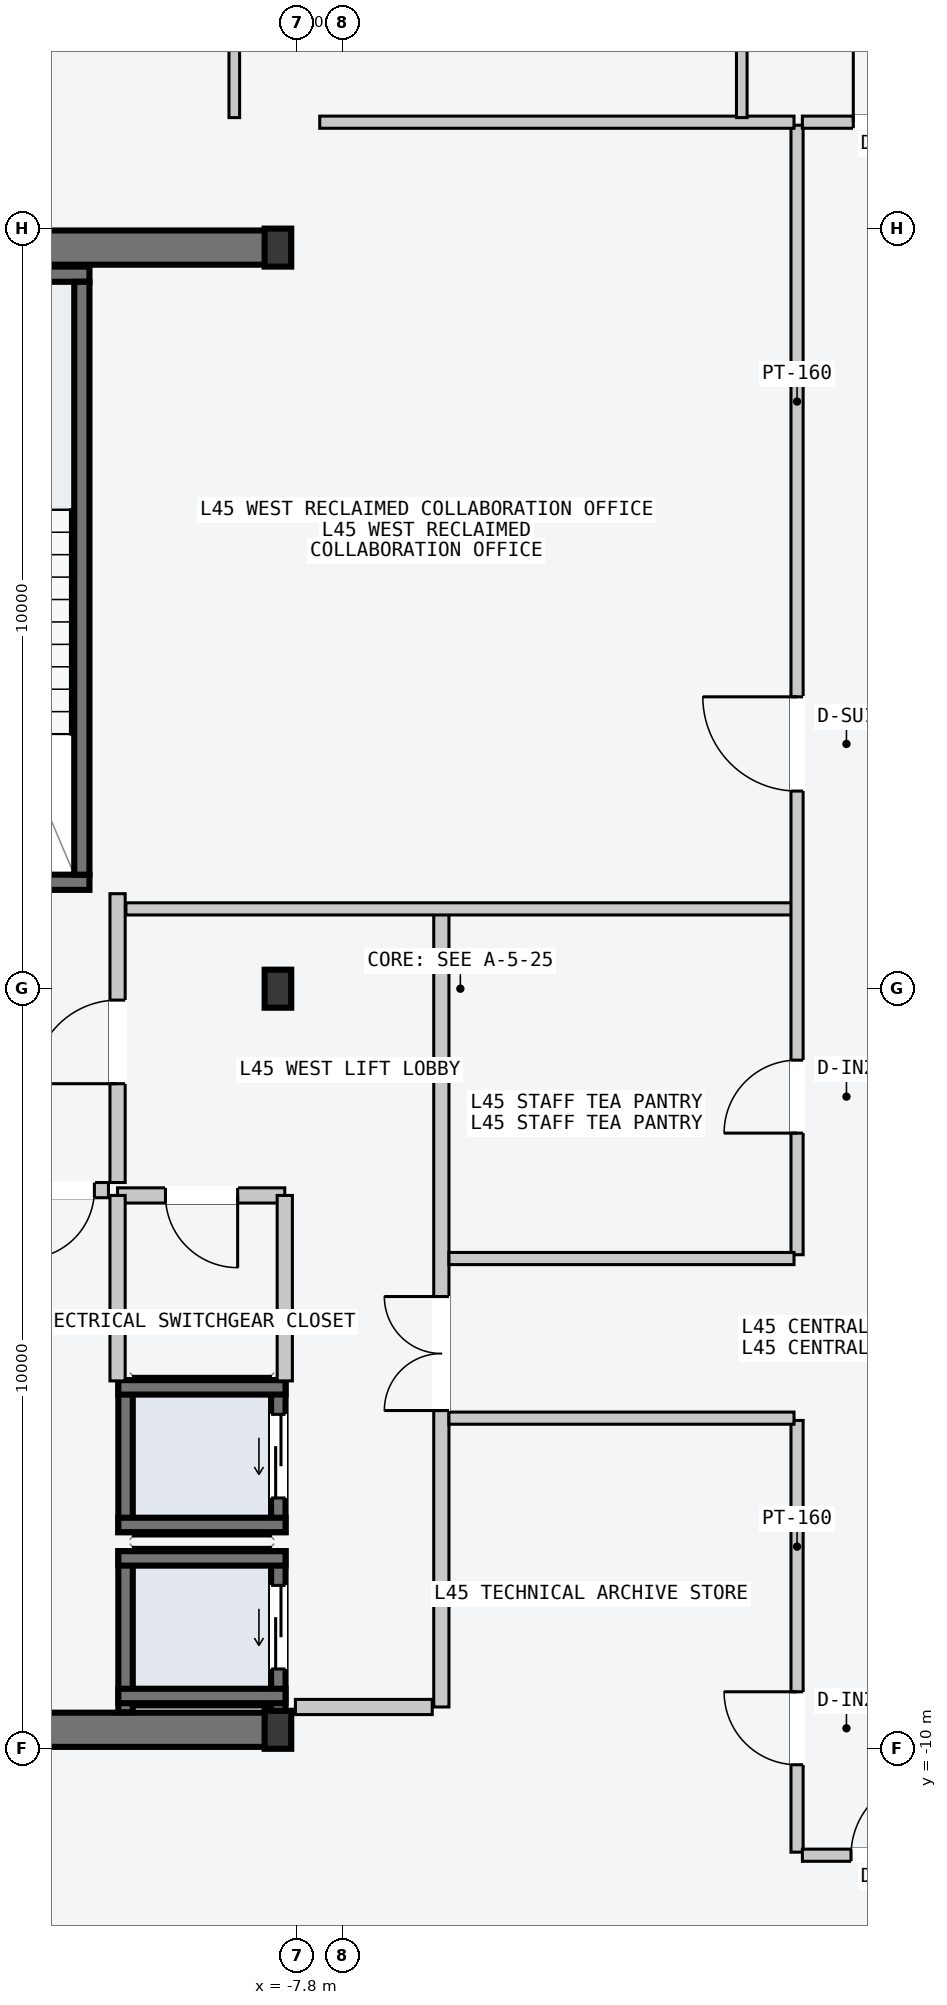
"""IFC4 building model, lengths in metres.
Left out: names, types, materials, properties, quantities, classifications, styles, units other than length and angle.
Written with IfcOpenShell. Run it as: python <this file> out.ifc"""

import sys

from ifc_helpers import new_model, si_unit, direction, frame, frame_2d, origin, origin_2d, place, context, subcontext, project, spatial, rectangle, i_section, extrude, element, fill, save


model = new_model("IFC4")
c1 = context("Model", 3, precision=1e-05, world=origin(), true_north=direction((0.0, 1.0)))
c2 = subcontext(c1, "Body", "Model", "MODEL_VIEW")
j1 = project(units=[si_unit("LENGTHUNIT", "METRE"), si_unit("PLANEANGLEUNIT", "RADIAN")], contexts=[c1])
p1 = place(None, origin())
s1 = spatial("IfcSite", under=j1, at=p1, CompositionType="ELEMENT")
p2 = place(p1, origin())
s2 = spatial("IfcBuilding", under=s1, at=p2, CompositionType="ELEMENT")
p3 = place(p2, frame((0.0, 0.0, 173.1)))
s3 = spatial("IfcBuildingStorey", under=s2, at=p3, CompositionType="ELEMENT", Elevation=173.1)
for number, where, z_axis, x_axis in (
    (1, (-14.53, -9.75, -0.2), (0.0, 0.0, 1.0), (1.0, 0.0, 0.0)),
    (2, (-14.53, 9.75, -0.2), (0.0, 0.0, 1.0), (1.0, 0.0, 0.0)),
):
    element("IfcWall", number, at=place(p3, frame(where, z_axis=z_axis, x_axis=x_axis)), inside=s3, PredefinedType="SHEAR", context=c2, shape_type="SweptSolid", body=[
        extrude(rectangle(XDim=6.46, YDim=0.45, at=frame_2d((3.23, 0.0))), origin(), (0.0, 0.0, 1.0), 3.6),
    ])
p4 = place(p3, frame((-14.25, 1.4, -0.2), z_axis=(0.0, 0.0, 1.0), x_axis=(1.0, 0.0, 0.0)))
e3 = element("IfcWall", 3, at=p4, inside=s3, PredefinedType="SOLIDWALL", context=c2, shape_type="SweptSolid", body=[
    extrude(rectangle(XDim=3.72, YDim=0.2, at=frame_2d((1.86, 0.0))), origin(), (0.0, 0.0, 1.0), 3.6),
])
p5 = place(p4, frame((1.5, 0.0, 0.2)))
e4 = element("IfcOpeningElement", 4, at=p5, cuts=e3, PredefinedType="OPENING", context=c2, shape_type="SweptSolid", body=[
    extrude(rectangle(XDim=1.12, YDim=2.18, at=frame_2d((0.56, 1.09))), frame((0.0, 0.11, 0.0), z_axis=(0.0, -1.0, 0.0), x_axis=(1.0, 0.0, 0.0)), (0.0, 0.0, 1.0), 0.22),
])
p6 = place(p3, frame((-14.25, 9.4, -0.2), z_axis=(0.0, 0.0, 1.0), x_axis=(1.0, 0.0, 0.0)))
e5 = element("IfcWall", 5, at=p6, inside=s3, PredefinedType="SOLIDWALL", context=c2, shape_type="SweptSolid", body=[
    extrude(rectangle(XDim=3.72, YDim=0.2, at=frame_2d((1.86, 0.0))), origin(), (0.0, 0.0, 1.0), 3.6),
])
p7 = place(p3, frame((-10.63, 1.5, -0.2), z_axis=(0.0, 0.0, 1.0), x_axis=(0.0, 1.0, 0.0)))
e6 = element("IfcWall", 6, at=p7, inside=s3, PredefinedType="SOLIDWALL", context=c2, shape_type="SweptSolid", body=[
    extrude(rectangle(XDim=7.8, YDim=0.2, at=frame_2d((3.9, 0.0))), origin(), (0.0, 0.0, 1.0), 3.6),
])
for number, where, z_axis, x_axis in (
    (7, (-8.05, -9.75, 0.0), (0.0, 0.0, 1.0), (1.0, 0.0, 0.0)),
    (8, (-8.05, 0.0, 0.0), (0.0, 0.0, 1.0), (1.0, 0.0, 0.0)),
    (9, (-8.05, 9.75, 0.0), (0.0, 0.0, 1.0), (1.0, 0.0, 0.0)),
):
    element("IfcColumn", number, at=place(p3, frame(where, z_axis=z_axis, x_axis=x_axis)), inside=s3, PredefinedType="COLUMN", context=c2, shape_type="SweptSolid", body=[
        extrude(i_section(OverallWidth=0.35, OverallDepth=0.5, WebThickness=0.02, FlangeThickness=0.032, at=origin_2d()), origin(), (0.0, 0.0, 1.0), 3.6),
    ])
p8 = place(p3, frame((-8.045, -9.52, -0.2), z_axis=(0.0, 0.0, 1.0), x_axis=(0.0, 1.0, 0.0)))
e10 = element("IfcWall", 10, at=p8, inside=s3, PredefinedType="SOLIDWALL", context=c2, shape_type="SweptSolid", body=[
    extrude(rectangle(XDim=2.12, YDim=0.19, at=frame_2d((1.06, 0.0))), origin(), (0.0, 0.0, 1.0), 3.6),
])
p9 = place(p8, frame((0.57, 0.0, 0.2)))
e11 = element("IfcOpeningElement", 11, at=p9, cuts=e10, PredefinedType="OPENING", context=c2, shape_type="SweptSolid", body=[
    extrude(rectangle(XDim=1.1, YDim=2.2, at=frame_2d((0.55, 1.1))), frame((0.0, 0.105, 0.0), z_axis=(0.0, -1.0, 0.0), x_axis=(1.0, 0.0, 0.0)), (0.0, 0.0, 1.0), 0.21),
])
p10 = place(p3, frame((-10.055, -9.52, -0.2), z_axis=(0.0, 0.0, 1.0), x_axis=(0.0, 1.0, 0.0)))
e12 = element("IfcWall", 12, at=p10, inside=s3, PredefinedType="SOLIDWALL", context=c2, shape_type="SweptSolid", body=[
    extrude(rectangle(XDim=2.12, YDim=0.19, at=frame_2d((1.06, 0.0))), origin(), (0.0, 0.0, 1.0), 3.6),
])
for number, where, z_axis, x_axis in (
    (13, (-10.15, -7.495, -0.2), (0.0, 0.0, 1.0), (1.0, 0.0, 0.0)),
    (14, (-10.15, -9.305, -0.2), (0.0, 0.0, 1.0), (1.0, 0.0, 0.0)),
):
    element("IfcWall", number, at=place(p3, frame(where, z_axis=z_axis, x_axis=x_axis)), inside=s3, PredefinedType="SOLIDWALL", context=c2, shape_type="SweptSolid", body=[
        extrude(rectangle(XDim=2.2, YDim=0.19, at=frame_2d((1.1, 0.0))), origin(), (0.0, 0.0, 1.0), 3.6),
    ])
p11 = place(p3, frame((-8.045, -7.15, -0.2), z_axis=(0.0, 0.0, 1.0), x_axis=(0.0, 1.0, 0.0)))
e15 = element("IfcWall", 15, at=p11, inside=s3, PredefinedType="SOLIDWALL", context=c2, shape_type="SweptSolid", body=[
    extrude(rectangle(XDim=2.0, YDim=0.19, at=frame_2d((1.0, 0.0))), origin(), (0.0, 0.0, 1.0), 3.6),
])
p12 = place(p11, frame((0.45, 0.0, 0.2)))
e16 = element("IfcOpeningElement", 16, at=p12, cuts=e15, PredefinedType="OPENING", context=c2, shape_type="SweptSolid", body=[
    extrude(rectangle(XDim=1.1, YDim=2.2, at=frame_2d((0.55, 1.1))), frame((0.0, 0.105, 0.0), z_axis=(0.0, -1.0, 0.0), x_axis=(1.0, 0.0, 0.0)), (0.0, 0.0, 1.0), 0.21),
])
p13 = place(p3, frame((-10.055, -7.15, -0.2), z_axis=(0.0, 0.0, 1.0), x_axis=(0.0, 1.0, 0.0)))
e17 = element("IfcWall", 17, at=p13, inside=s3, PredefinedType="SOLIDWALL", context=c2, shape_type="SweptSolid", body=[
    extrude(rectangle(XDim=2.0, YDim=0.19, at=frame_2d((1.0, 0.0))), origin(), (0.0, 0.0, 1.0), 3.6),
])
for number, where, z_axis, x_axis in (
    (18, (-10.15, -5.245, -0.2), (0.0, 0.0, 1.0), (1.0, 0.0, 0.0)),
    (19, (-10.15, -7.055, -0.2), (0.0, 0.0, 1.0), (1.0, 0.0, 0.0)),
):
    element("IfcWall", number, at=place(p3, frame(where, z_axis=z_axis, x_axis=x_axis)), inside=s3, PredefinedType="SOLIDWALL", context=c2, shape_type="SweptSolid", body=[
        extrude(rectangle(XDim=2.2, YDim=0.19, at=frame_2d((1.1, 0.0))), origin(), (0.0, 0.0, 1.0), 3.6),
    ])
p14 = place(p3, frame((-5.9, -9.45, 0.0), z_axis=(0.0, 0.0, 1.0), x_axis=(0.0, 1.0, 0.0)))
e20 = element("IfcWall", 20, at=p14, inside=s3, PredefinedType="PARTITIONING", context=c2, shape_type="SweptSolid", body=[
    extrude(rectangle(XDim=10.5, YDim=0.2, at=frame_2d((5.25, 0.0))), origin(), (0.0, 0.0, 1.0), 3.4),
])
p15 = place(p14, frame((3.9, 0.0, 0.0)))
e21 = element("IfcOpeningElement", 21, at=p15, cuts=e20, PredefinedType="OPENING", context=c2, shape_type="SweptSolid", body=[
    extrude(rectangle(XDim=1.5, YDim=2.2, at=frame_2d((0.75, 1.1))), frame((0.0, 0.11, 0.0), z_axis=(0.0, -1.0, 0.0), x_axis=(1.0, 0.0, 0.0)), (0.0, 0.0, 1.0), 0.22),
])
p16 = place(p3, frame((-6.02, -9.45, 0.0), z_axis=(0.0, 0.0, 1.0), x_axis=(-1.0, 0.0, 0.0)))
e22 = element("IfcWall", 22, at=p16, inside=s3, PredefinedType="PARTITIONING", context=c2, shape_type="SweptSolid", body=[
    extrude(rectangle(XDim=1.8, YDim=0.2, at=frame_2d((0.9, 0.0))), origin(), (0.0, 0.0, 1.0), 3.4),
])
p17 = place(p3, frame((-10.16, -2.55, 0.0), z_axis=(0.0, 0.0, 1.0), x_axis=(0.0, 1.0, 0.0)))
e23 = element("IfcWall", 23, at=p17, inside=s3, PredefinedType="PARTITIONING", context=c2, shape_type="SweptSolid", body=[
    extrude(rectangle(XDim=3.8, YDim=0.2, at=frame_2d((1.9, 0.0))), origin(), (0.0, 0.0, 1.0), 3.4),
])
p18 = place(p17, frame((1.3, 0.0, 0.0)))
e24 = element("IfcOpeningElement", 24, at=p18, cuts=e23, PredefinedType="OPENING", context=c2, shape_type="SweptSolid", body=[
    extrude(rectangle(XDim=1.1, YDim=2.15, at=frame_2d((0.55, 1.075))), frame((0.0, 0.11, 0.0), z_axis=(0.0, -1.0, 0.0), x_axis=(1.0, 0.0, 0.0)), (0.0, 0.0, 1.0), 0.22),
])
p19 = place(p3, frame((-10.28, -2.65, 0.0), z_axis=(0.0, 0.0, 1.0), x_axis=(-1.0, 0.0, 0.0)))
e25 = element("IfcWall", 25, at=p19, inside=s3, PredefinedType="PARTITIONING", context=c2, shape_type="SweptSolid", body=[
    extrude(rectangle(XDim=1.27, YDim=0.2, at=frame_2d((0.635, 0.0))), origin(), (0.0, 0.0, 1.0), 3.4),
])
p20 = place(p19, frame((0.185, 0.0, 0.0)))
e26 = element("IfcOpeningElement", 26, at=p20, cuts=e25, PredefinedType="OPENING", context=c2, shape_type="SweptSolid", body=[
    extrude(rectangle(XDim=0.9, YDim=2.15, at=frame_2d((0.45, 1.075))), frame((0.0, 0.11, 0.0), z_axis=(0.0, -1.0, 0.0), x_axis=(1.0, 0.0, 0.0)), (0.0, 0.0, 1.0), 0.22),
])
p21 = place(p3, frame((-7.96, -2.72, 0.0), z_axis=(0.0, 0.0, 1.0), x_axis=(-1.0, 0.0, 0.0)))
e27 = element("IfcWall", 27, at=p21, inside=s3, PredefinedType="PARTITIONING", context=c2, shape_type="SweptSolid", body=[
    extrude(rectangle(XDim=2.2, YDim=0.2, at=frame_2d((1.1, 0.0))), origin(), (0.0, 0.0, 1.0), 3.4),
])
p22 = place(p21, frame((0.62, 0.0, 0.0)))
e28 = element("IfcOpeningElement", 28, at=p22, cuts=e27, PredefinedType="OPENING", context=c2, shape_type="SweptSolid", body=[
    extrude(rectangle(XDim=0.95, YDim=2.1, at=frame_2d((0.475, 1.05))), frame((0.0, 0.11, 0.0), z_axis=(0.0, -1.0, 0.0), x_axis=(1.0, 0.0, 0.0)), (0.0, 0.0, 1.0), 0.22),
])
for number, where, z_axis, x_axis in (
    (29, (-7.96, -5.16, 0.0), (0.0, 0.0, 1.0), (0.0, 1.0, 0.0)),
    (30, (-10.16, -5.16, 0.0), (0.0, 0.0, 1.0), (0.0, 1.0, 0.0)),
):
    element("IfcWall", number, at=place(p3, frame(where, z_axis=z_axis, x_axis=x_axis)), inside=s3, PredefinedType="PARTITIONING", context=c2, shape_type="SweptSolid", body=[
        extrude(rectangle(XDim=2.44, YDim=0.2, at=frame_2d((1.22, 0.0))), origin(), (0.0, 0.0, 1.0), 3.4),
    ])
p23 = place(p3, frame((-10.05, 1.05, 0.0), z_axis=(0.0, 0.0, 1.0), x_axis=(1.0, 0.0, 0.0)))
e31 = element("IfcWall", 31, at=p23, inside=s3, PredefinedType="PARTITIONING", context=c2, shape_type="SweptSolid", body=[
    extrude(rectangle(XDim=8.79, YDim=0.16, at=frame_2d((4.395, 0.0))), origin(), (0.0, 0.0, 1.0), 3.4),
])
p24 = place(p3, frame((-1.22, -3.5, 0.0), z_axis=(0.0, 0.0, 1.0), x_axis=(0.0, 1.0, 0.0)))
e32 = element("IfcWall", 32, at=p24, inside=s3, PredefinedType="PARTITIONING", context=c2, shape_type="SweptSolid", body=[
    extrude(rectangle(XDim=14.86, YDim=0.16, at=frame_2d((7.43, 0.0))), origin(), (0.0, 0.0, 1.0), 3.4),
])
p25 = place(p24, frame((6.1, 0.0, 0.0)))
e33 = element("IfcOpeningElement", 33, at=p25, cuts=e32, PredefinedType="OPENING", context=c2, shape_type="SweptSolid", body=[
    extrude(rectangle(XDim=1.24, YDim=2.24, at=frame_2d((0.62, 1.12))), frame((0.0, 0.09, 0.0), z_axis=(0.0, -1.0, 0.0), x_axis=(1.0, 0.0, 0.0)), (0.0, 0.0, 1.0), 0.18),
])
p26 = place(p24, frame((1.6, 0.0, 0.0)))
e34 = element("IfcOpeningElement", 34, at=p26, cuts=e32, PredefinedType="OPENING", context=c2, shape_type="SweptSolid", body=[
    extrude(rectangle(XDim=0.96, YDim=2.18, at=frame_2d((0.48, 1.09))), frame((0.0, 0.09, 0.0), z_axis=(0.0, -1.0, 0.0), x_axis=(1.0, 0.0, 0.0)), (0.0, 0.0, 1.0), 0.18),
])
p27 = place(p3, frame((-7.5, 11.4, 0.0), z_axis=(0.0, 0.0, 1.0), x_axis=(1.0, 0.0, 0.0)))
e35 = element("IfcWall", 35, at=p27, inside=s3, PredefinedType="PARTITIONING", context=c2, shape_type="SweptSolid", body=[
    extrude(rectangle(XDim=6.24, YDim=0.16, at=frame_2d((3.12, 0.0))), origin(), (0.0, 0.0, 1.0), 3.4),
])
p28 = place(p3, frame((-5.8, -3.55, 0.0), z_axis=(0.0, 0.0, 1.0), x_axis=(1.0, 0.0, 0.0)))
e36 = element("IfcWall", 36, at=p28, inside=s3, PredefinedType="PARTITIONING", context=c2, shape_type="SweptSolid", body=[
    extrude(rectangle(XDim=4.54, YDim=0.16, at=frame_2d((2.27, 0.0))), origin(), (0.0, 0.0, 1.0), 3.4),
])
p29 = place(p3, frame((-1.22, -11.36, 0.0), z_axis=(0.0, 0.0, 1.0), x_axis=(0.0, 1.0, 0.0)))
e37 = element("IfcWall", 37, at=p29, inside=s3, PredefinedType="PARTITIONING", context=c2, shape_type="SweptSolid", body=[
    extrude(rectangle(XDim=5.68, YDim=0.16, at=frame_2d((2.84, 0.0))), origin(), (0.0, 0.0, 1.0), 3.4),
])
p30 = place(p29, frame((1.15, 0.0, 0.0)))
e38 = element("IfcOpeningElement", 38, at=p30, cuts=e37, PredefinedType="OPENING", context=c2, shape_type="SweptSolid", body=[
    extrude(rectangle(XDim=0.96, YDim=2.18, at=frame_2d((0.48, 1.09))), frame((0.0, 0.09, 0.0), z_axis=(0.0, -1.0, 0.0), x_axis=(1.0, 0.0, 0.0)), (0.0, 0.0, 1.0), 0.18),
])
p31 = place(p3, frame((-5.8, -5.65, 0.0), z_axis=(0.0, 0.0, 1.0), x_axis=(1.0, 0.0, 0.0)))
e39 = element("IfcWall", 39, at=p31, inside=s3, PredefinedType="PARTITIONING", context=c2, shape_type="SweptSolid", body=[
    extrude(rectangle(XDim=4.54, YDim=0.16, at=frame_2d((2.27, 0.0))), origin(), (0.0, 0.0, 1.0), 3.4),
])
p32 = place(p3, frame((-8.624, 11.46, 0.0), z_axis=(0.0, 0.0, 1.0), x_axis=(0.0, 1.0, 0.0)))
e40 = element("IfcWall", 40, at=p32, inside=s3, PredefinedType="PARTITIONING", context=c2, shape_type="SweptSolid", body=[
    extrude(rectangle(XDim=6.09, YDim=0.14, at=frame_2d((3.045, 0.0))), origin(), (0.0, 0.0, 1.0), 3.4),
])
p33 = place(p32, frame((1.15, 0.0, 0.0)))
e41 = element("IfcOpeningElement", 41, at=p33, cuts=e40, PredefinedType="OPENING", context=c2, shape_type="SweptSolid", body=[
    extrude(rectangle(XDim=0.96, YDim=2.18, at=frame_2d((0.48, 1.09))), frame((0.0, 0.08, 0.0), z_axis=(0.0, -1.0, 0.0), x_axis=(1.0, 0.0, 0.0)), (0.0, 0.0, 1.0), 0.16),
])
p34 = place(p3, frame((-1.948, 11.46, 0.0), z_axis=(0.0, 0.0, 1.0), x_axis=(0.0, 1.0, 0.0)))
e42 = element("IfcWall", 42, at=p34, inside=s3, PredefinedType="PARTITIONING", context=c2, shape_type="SweptSolid", body=[
    extrude(rectangle(XDim=7.1, YDim=0.14, at=frame_2d((3.55, 0.0))), origin(), (0.0, 0.0, 1.0), 3.4),
])
p35 = place(p34, frame((1.15, 0.0, 0.0)))
e43 = element("IfcOpeningElement", 43, at=p35, cuts=e42, PredefinedType="OPENING", context=c2, shape_type="SweptSolid", body=[
    extrude(rectangle(XDim=0.96, YDim=2.18, at=frame_2d((0.48, 1.09))), frame((0.0, 0.08, 0.0), z_axis=(0.0, -1.0, 0.0), x_axis=(1.0, 0.0, 0.0)), (0.0, 0.0, 1.0), 0.16),
])
p36 = place(p3, frame((-1.15, 11.4, 0.0), z_axis=(0.0, 0.0, 1.0), x_axis=(1.0, 0.0, 0.0)))
e44 = element("IfcWall", 44, at=p36, inside=s3, PredefinedType="PARTITIONING", context=c2, shape_type="SweptSolid", body=[
    extrude(rectangle(XDim=2.3, YDim=0.16, at=frame_2d((1.15, 0.0))), origin(), (0.0, 0.0, 1.0), 3.4),
])
p37 = place(p36, frame((0.67, 0.0, 0.0)))
e45 = element("IfcOpeningElement", 45, at=p37, cuts=e44, PredefinedType="OPENING", context=c2, shape_type="SweptSolid", body=[
    extrude(rectangle(XDim=0.96, YDim=2.18, at=frame_2d((0.48, 1.09))), frame((0.0, 0.09, 0.0), z_axis=(0.0, -1.0, 0.0), x_axis=(1.0, 0.0, 0.0)), (0.0, 0.0, 1.0), 0.18),
])
p38 = place(p3, frame((-1.15, -11.4, 0.0), z_axis=(0.0, 0.0, 1.0), x_axis=(1.0, 0.0, 0.0)))
e46 = element("IfcWall", 46, at=p38, inside=s3, PredefinedType="PARTITIONING", context=c2, shape_type="SweptSolid", body=[
    extrude(rectangle(XDim=2.3, YDim=0.16, at=frame_2d((1.15, 0.0))), origin(), (0.0, 0.0, 1.0), 3.4),
])
p39 = place(p38, frame((0.64, 0.0, 0.0)))
e47 = element("IfcOpeningElement", 47, at=p39, cuts=e46, PredefinedType="OPENING", context=c2, shape_type="SweptSolid", body=[
    extrude(rectangle(XDim=1.02, YDim=2.2, at=frame_2d((0.51, 1.1))), frame((0.0, 0.09, 0.0), z_axis=(0.0, -1.0, 0.0), x_axis=(1.0, 0.0, 0.0)), (0.0, 0.0, 1.0), 0.18),
])
p40 = place(p9, origin())
e48 = element("IfcDoor", 48, at=p40, inside=s3, OperationType="SLIDING_TO_LEFT", PredefinedType="DOOR", context=c2, shape_type="SweptSolid", body=[
    extrude(rectangle(XDim=1.1, YDim=2.2, at=frame_2d((0.55, 1.1))), frame((0.0, 0.025, 0.0), z_axis=(0.0, -1.0, 0.0), x_axis=(1.0, 0.0, 0.0)), (0.0, 0.0, 1.0), 0.05),
])
fill(e11, e48)
p41 = place(p12, origin())
e49 = element("IfcDoor", 49, at=p41, inside=s3, OperationType="SLIDING_TO_LEFT", PredefinedType="DOOR", context=c2, shape_type="SweptSolid", body=[
    extrude(rectangle(XDim=1.1, YDim=2.2, at=frame_2d((0.55, 1.1))), frame((0.0, 0.025, 0.0), z_axis=(0.0, -1.0, 0.0), x_axis=(1.0, 0.0, 0.0)), (0.0, 0.0, 1.0), 0.05),
])
fill(e16, e49)
p42 = place(p15, origin())
e50 = element("IfcDoor", 50, at=p42, inside=s3, OperationType="DOUBLE_DOOR_SINGLE_SWING", PredefinedType="DOOR", context=c2, shape_type="SweptSolid", body=[
    extrude(rectangle(XDim=1.5, YDim=2.2, at=frame_2d((0.75, 1.1))), frame((0.0, 0.025, 0.0), z_axis=(0.0, -1.0, 0.0), x_axis=(1.0, 0.0, 0.0)), (0.0, 0.0, 1.0), 0.05),
])
fill(e21, e50)
p43 = place(p18, origin())
e51 = element("IfcDoor", 51, at=p43, inside=s3, OperationType="SINGLE_SWING_LEFT", PredefinedType="DOOR", context=c2, shape_type="SweptSolid", body=[
    extrude(rectangle(XDim=1.1, YDim=2.15, at=frame_2d((0.55, 1.075))), frame((0.0, 0.025, 0.0), z_axis=(0.0, -1.0, 0.0), x_axis=(1.0, 0.0, 0.0)), (0.0, 0.0, 1.0), 0.05),
])
fill(e24, e51)
p44 = place(p20, origin())
e52 = element("IfcDoor", 52, at=p44, inside=s3, OperationType="SINGLE_SWING_RIGHT", PredefinedType="DOOR", context=c2, shape_type="SweptSolid", body=[
    extrude(rectangle(XDim=0.9, YDim=2.15, at=frame_2d((0.45, 1.075))), frame((0.0, 0.025, 0.0), z_axis=(0.0, -1.0, 0.0), x_axis=(1.0, 0.0, 0.0)), (0.0, 0.0, 1.0), 0.05),
])
fill(e26, e52)
p45 = place(p22, origin())
e53 = element("IfcDoor", 53, at=p45, inside=s3, OperationType="SINGLE_SWING_LEFT", PredefinedType="DOOR", context=c2, shape_type="SweptSolid", body=[
    extrude(rectangle(XDim=0.95, YDim=2.1, at=frame_2d((0.475, 1.05))), frame((0.0, 0.025, 0.0), z_axis=(0.0, -1.0, 0.0), x_axis=(1.0, 0.0, 0.0)), (0.0, 0.0, 1.0), 0.05),
])
fill(e28, e53)
p46 = place(p25, origin())
e54 = element("IfcDoor", 54, at=p46, inside=s3, OperationType="SINGLE_SWING_RIGHT", PredefinedType="DOOR", context=c2, shape_type="SweptSolid", body=[
    extrude(rectangle(XDim=1.24, YDim=2.24, at=frame_2d((0.62, 1.12))), frame((0.0, 0.025, 0.0), z_axis=(0.0, -1.0, 0.0), x_axis=(1.0, 0.0, 0.0)), (0.0, 0.0, 1.0), 0.05),
])
fill(e33, e54)
p47 = place(p26, origin())
e55 = element("IfcDoor", 55, at=p47, inside=s3, OperationType="SINGLE_SWING_LEFT", PredefinedType="DOOR", context=c2, shape_type="SweptSolid", body=[
    extrude(rectangle(XDim=0.96, YDim=2.18, at=frame_2d((0.48, 1.09))), frame((0.0, 0.025, 0.0), z_axis=(0.0, -1.0, 0.0), x_axis=(1.0, 0.0, 0.0)), (0.0, 0.0, 1.0), 0.05),
])
fill(e34, e55)
p48 = place(p30, origin())
e56 = element("IfcDoor", 56, at=p48, inside=s3, OperationType="SINGLE_SWING_RIGHT", PredefinedType="DOOR", context=c2, shape_type="SweptSolid", body=[
    extrude(rectangle(XDim=0.96, YDim=2.18, at=frame_2d((0.48, 1.09))), frame((0.0, 0.025, 0.0), z_axis=(0.0, -1.0, 0.0), x_axis=(1.0, 0.0, 0.0)), (0.0, 0.0, 1.0), 0.05),
])
fill(e38, e56)
p49 = place(p37, origin())
e57 = element("IfcDoor", 57, at=p49, inside=s3, OperationType="SINGLE_SWING_LEFT", PredefinedType="DOOR", context=c2, shape_type="SweptSolid", body=[
    extrude(rectangle(XDim=0.96, YDim=2.18, at=frame_2d((0.48, 1.09))), frame((0.0, 0.025, 0.0), z_axis=(0.0, -1.0, 0.0), x_axis=(1.0, 0.0, 0.0)), (0.0, 0.0, 1.0), 0.05),
])
fill(e45, e57)
p50 = place(p39, origin())
e58 = element("IfcDoor", 58, at=p50, inside=s3, OperationType="SINGLE_SWING_RIGHT", PredefinedType="DOOR", context=c2, shape_type="SweptSolid", body=[
    extrude(rectangle(XDim=1.02, YDim=2.2, at=frame_2d((0.51, 1.1))), frame((0.0, 0.025, 0.0), z_axis=(0.0, -1.0, 0.0), x_axis=(1.0, 0.0, 0.0)), (0.0, 0.0, 1.0), 0.05),
])
fill(e47, e58)
save(model, sys.argv[1])
